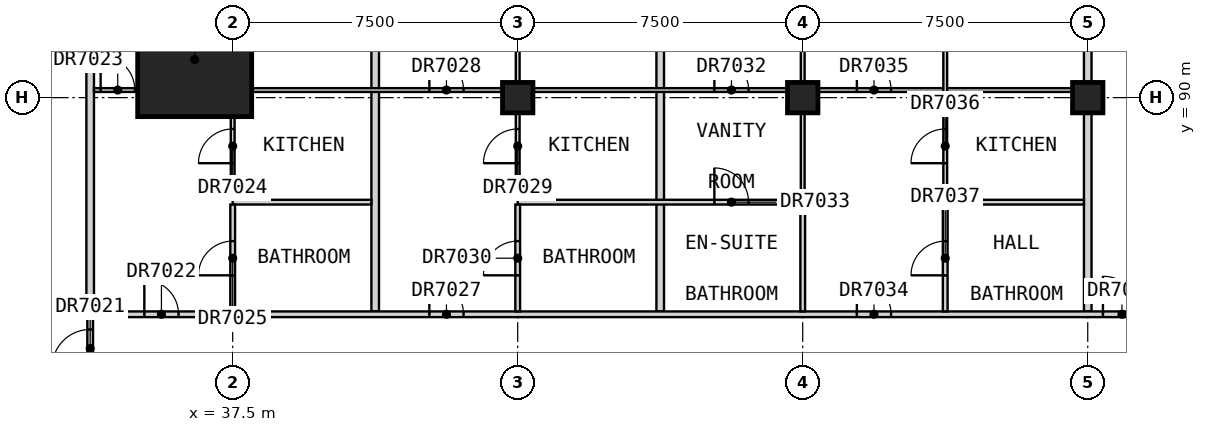
"""IFC4 building model, lengths in metres.
Left out: names, types, materials, properties, quantities, classifications, styles, units other than length and angle.
Written with IfcOpenShell. Run it as: python <this file> out.ifc"""

import sys

from ifc_helpers import new_model, si_unit, direction, frame, frame_2d, origin, origin_2d, place, context, subcontext, project, spatial, rectangle, extrude, element, fill, save


model = new_model("IFC4")
c1 = context("Model", 3, precision=1e-05, world=origin(), true_north=direction((0.0, 1.0)))
c2 = subcontext(c1, "Body", "Model", "MODEL_VIEW")
j1 = project(units=[si_unit("LENGTHUNIT", "METRE"), si_unit("PLANEANGLEUNIT", "RADIAN")], contexts=[c1])
p1 = place(None, origin())
s1 = spatial("IfcSite", under=j1, at=p1, CompositionType="ELEMENT")
p2 = place(p1, origin())
s2 = spatial("IfcBuilding", under=s1, at=p2, CompositionType="ELEMENT")
p3 = place(p2, frame((0.0, 0.0, 230.2)))
s3 = spatial("IfcBuildingStorey", under=s2, at=p3, CompositionType="ELEMENT", Elevation=230.2)
for number, where, z_axis, x_axis in (
    (1, (45.0, 90.0, 0.0), (0.0, 0.0, 1.0), (1.0, 0.0, 0.0)),
    (2, (52.5, 90.0, 0.0), (0.0, 0.0, 1.0), (1.0, 0.0, 0.0)),
    (3, (60.0, 90.0, 0.0), (0.0, 0.0, 1.0), (1.0, 0.0, 0.0)),
):
    element("IfcColumn", number, at=place(p3, frame(where, z_axis=z_axis, x_axis=x_axis)), inside=s3, PredefinedType="COLUMN", context=c2, shape_type="SweptSolid", body=[
        extrude(rectangle(XDim=0.8, YDim=0.8, at=origin_2d()), origin(), (0.0, 0.0, 1.0), 3.5),
    ])
p4 = place(p3, frame((36.5, 91.0, 0.0), z_axis=(0.0, 0.0, 1.0), x_axis=(1.0, 0.0, 0.0)))
e4 = element("IfcColumn", 4, at=p4, inside=s3, PredefinedType="COLUMN", context=c2, shape_type="SweptSolid", body=[
    extrude(rectangle(XDim=3.0, YDim=3.0, at=origin_2d()), origin(), (0.0, 0.0, 1.0), 3.5),
])
p5 = place(p3, frame((33.75, 84.3, 0.0), z_axis=(0.0, 0.0, 1.0), x_axis=(0.0, 1.0, 0.0)))
e5 = element("IfcWall", 5, at=p5, inside=s3, PredefinedType="PARTITIONING", context=c2, shape_type="SweptSolid", body=[
    extrude(rectangle(XDim=7.39, YDim=0.2, at=frame_2d((3.695, 0.0))), origin(), (0.0, 0.0, 1.0), 3.25),
])
for number, where, z_axis, x_axis in (
    (6, (41.25, 84.375, 0.0), (0.0, 0.0, 1.0), (0.0, 1.0, 0.0)),
    (7, (48.75, 84.375, 0.0), (0.0, 0.0, 1.0), (0.0, 1.0, 0.0)),
):
    element("IfcWall", number, at=place(p3, frame(where, z_axis=z_axis, x_axis=x_axis)), inside=s3, PredefinedType="PARTITIONING", context=c2, shape_type="SweptSolid", body=[
        extrude(rectangle(XDim=12.315, YDim=0.2, at=frame_2d((6.157, 0.0))), origin(), (0.0, 0.0, 1.0), 3.25),
    ])
p6 = place(p3, frame((60.0, 84.375, 0.0), z_axis=(0.0, 0.0, 1.0), x_axis=(0.0, 1.0, 0.0)))
e8 = element("IfcWall", 8, at=p6, inside=s3, PredefinedType="PARTITIONING", context=c2, shape_type="SweptSolid", body=[
    extrude(rectangle(XDim=13.125, YDim=0.2, at=frame_2d((6.562, 0.0))), origin(), (0.0, 0.0, 1.0), 3.25),
])
p7 = place(p3, frame((33.85, 84.3, 0.0), z_axis=(0.0, 0.0, 1.0), x_axis=(1.0, 0.0, 0.0)))
e9 = element("IfcWall", 9, at=p7, inside=s3, PredefinedType="PARTITIONING", context=c2, shape_type="SweptSolid", body=[
    extrude(rectangle(XDim=27.95, YDim=0.15, at=frame_2d((13.975, 0.0))), origin(), (0.0, 0.0, 1.0), 3.25),
])
p8 = place(p7, frame((1.325, 0.0, 0.0)))
e10 = element("IfcOpeningElement", 10, at=p8, cuts=e9, PredefinedType="OPENING", context=c2, shape_type="SweptSolid", body=[
    extrude(rectangle(XDim=0.9, YDim=2.1, at=frame_2d((0.45, 1.05))), frame((0.0, 0.085, 0.0), z_axis=(0.0, -1.0, 0.0), x_axis=(1.0, 0.0, 0.0)), (0.0, 0.0, 1.0), 0.17),
])
p9 = place(p7, frame((8.825, 0.0, 0.0)))
e11 = element("IfcOpeningElement", 11, at=p9, cuts=e9, PredefinedType="OPENING", context=c2, shape_type="SweptSolid", body=[
    extrude(rectangle(XDim=0.9, YDim=2.1, at=frame_2d((0.45, 1.05))), frame((0.0, 0.085, 0.0), z_axis=(0.0, -1.0, 0.0), x_axis=(1.0, 0.0, 0.0)), (0.0, 0.0, 1.0), 0.17),
])
p10 = place(p7, frame((20.075, 0.0, 0.0)))
e12 = element("IfcOpeningElement", 12, at=p10, cuts=e9, PredefinedType="OPENING", context=c2, shape_type="SweptSolid", body=[
    extrude(rectangle(XDim=0.9, YDim=2.1, at=frame_2d((0.45, 1.05))), frame((0.0, 0.085, 0.0), z_axis=(0.0, -1.0, 0.0), x_axis=(1.0, 0.0, 0.0)), (0.0, 0.0, 1.0), 0.17),
])
p11 = place(p7, frame((26.55, 0.0, 0.0)))
e13 = element("IfcOpeningElement", 13, at=p11, cuts=e9, PredefinedType="OPENING", context=c2, shape_type="SweptSolid", body=[
    extrude(rectangle(XDim=1.0, YDim=2.1, at=frame_2d((0.5, 1.05))), frame((0.0, 0.085, 0.0), z_axis=(0.0, -1.0, 0.0), x_axis=(1.0, 0.0, 0.0)), (0.0, 0.0, 1.0), 0.17),
])
p12 = place(p3, frame((33.75, 82.5, 0.0), z_axis=(0.0, 0.0, 1.0), x_axis=(0.0, 1.0, 0.0)))
e14 = element("IfcWall", 14, at=p12, inside=s3, PredefinedType="PARTITIONING", context=c2, shape_type="SweptSolid", body=[
    extrude(rectangle(XDim=1.725, YDim=0.15, at=frame_2d((0.863, 0.0))), origin(), (0.0, 0.0, 1.0), 3.25),
])
p13 = place(p12, frame((0.4, 0.0, 0.0)))
e15 = element("IfcOpeningElement", 15, at=p13, cuts=e14, PredefinedType="OPENING", context=c2, shape_type="SweptSolid", body=[
    extrude(rectangle(XDim=1.0, YDim=2.1, at=frame_2d((0.5, 1.05))), frame((0.0, 0.085, 0.0), z_axis=(0.0, -1.0, 0.0), x_axis=(1.0, 0.0, 0.0)), (0.0, 0.0, 1.0), 0.17),
])
p14 = place(p3, frame((33.85, 90.2, 0.0), z_axis=(0.0, 0.0, 1.0), x_axis=(1.0, 0.0, 0.0)))
e16 = element("IfcWall", 16, at=p14, inside=s3, PredefinedType="PARTITIONING", context=c2, shape_type="SweptSolid", body=[
    extrude(rectangle(XDim=26.05, YDim=0.1, at=frame_2d((13.025, 0.0))), origin(), (0.0, 0.0, 1.0), 3.25),
])
p15 = place(p14, frame((0.175, 0.0, 0.0)))
e17 = element("IfcOpeningElement", 17, at=p15, cuts=e16, PredefinedType="OPENING", context=c2, shape_type="SweptSolid", body=[
    extrude(rectangle(XDim=0.9, YDim=2.1, at=frame_2d((0.45, 1.05))), frame((0.0, 0.06, 0.0), z_axis=(0.0, -1.0, 0.0), x_axis=(1.0, 0.0, 0.0)), (0.0, 0.0, 1.0), 0.12),
])
p16 = place(p14, frame((8.825, 0.0, 0.0)))
e18 = element("IfcOpeningElement", 18, at=p16, cuts=e16, PredefinedType="OPENING", context=c2, shape_type="SweptSolid", body=[
    extrude(rectangle(XDim=0.9, YDim=2.1, at=frame_2d((0.45, 1.05))), frame((0.0, 0.06, 0.0), z_axis=(0.0, -1.0, 0.0), x_axis=(1.0, 0.0, 0.0)), (0.0, 0.0, 1.0), 0.12),
])
p17 = place(p14, frame((16.325, 0.0, 0.0)))
e19 = element("IfcOpeningElement", 19, at=p17, cuts=e16, PredefinedType="OPENING", context=c2, shape_type="SweptSolid", body=[
    extrude(rectangle(XDim=0.9, YDim=2.1, at=frame_2d((0.45, 1.05))), frame((0.0, 0.06, 0.0), z_axis=(0.0, -1.0, 0.0), x_axis=(1.0, 0.0, 0.0)), (0.0, 0.0, 1.0), 0.12),
])
p18 = place(p14, frame((20.075, 0.0, 0.0)))
e20 = element("IfcOpeningElement", 20, at=p18, cuts=e16, PredefinedType="OPENING", context=c2, shape_type="SweptSolid", body=[
    extrude(rectangle(XDim=0.9, YDim=2.1, at=frame_2d((0.45, 1.05))), frame((0.0, 0.06, 0.0), z_axis=(0.0, -1.0, 0.0), x_axis=(1.0, 0.0, 0.0)), (0.0, 0.0, 1.0), 0.12),
])
p19 = place(p3, frame((37.5, 87.312, 0.0), z_axis=(0.0, 0.0, 1.0), x_axis=(0.0, 1.0, 0.0)))
e21 = element("IfcWall", 21, at=p19, inside=s3, PredefinedType="PARTITIONING", context=c2, shape_type="SweptSolid", body=[
    extrude(rectangle(XDim=10.188, YDim=0.1, at=frame_2d((5.094, 0.0))), origin(), (0.0, 0.0, 1.0), 2.75),
])
p20 = place(p19, frame((0.962, 0.0, 0.0)))
e22 = element("IfcOpeningElement", 22, at=p20, cuts=e21, PredefinedType="OPENING", context=c2, shape_type="SweptSolid", body=[
    extrude(rectangle(XDim=0.9, YDim=2.1, at=frame_2d((0.45, 1.05))), frame((0.0, 0.06, 0.0), z_axis=(0.0, -1.0, 0.0), x_axis=(1.0, 0.0, 0.0)), (0.0, 0.0, 1.0), 0.12),
])
p21 = place(p19, frame((6.087, 0.0, 0.0)))
e23 = element("IfcOpeningElement", 23, at=p21, cuts=e21, PredefinedType="OPENING", context=c2, shape_type="SweptSolid", body=[
    extrude(rectangle(XDim=0.9, YDim=2.1, at=frame_2d((0.45, 1.05))), frame((0.0, 0.06, 0.0), z_axis=(0.0, -1.0, 0.0), x_axis=(1.0, 0.0, 0.0)), (0.0, 0.0, 1.0), 0.12),
])
p22 = place(p3, frame((45.0, 87.312, 0.0), z_axis=(0.0, 0.0, 1.0), x_axis=(0.0, 1.0, 0.0)))
e24 = element("IfcWall", 24, at=p22, inside=s3, PredefinedType="PARTITIONING", context=c2, shape_type="SweptSolid", body=[
    extrude(rectangle(XDim=10.188, YDim=0.1, at=frame_2d((5.094, 0.0))), origin(), (0.0, 0.0, 1.0), 3.25),
])
p23 = place(p22, frame((0.962, 0.0, 0.0)))
e25 = element("IfcOpeningElement", 25, at=p23, cuts=e24, PredefinedType="OPENING", context=c2, shape_type="SweptSolid", body=[
    extrude(rectangle(XDim=0.9, YDim=2.1, at=frame_2d((0.45, 1.05))), frame((0.0, 0.06, 0.0), z_axis=(0.0, -1.0, 0.0), x_axis=(1.0, 0.0, 0.0)), (0.0, 0.0, 1.0), 0.12),
])
p24 = place(p22, frame((6.087, 0.0, 0.0)))
e26 = element("IfcOpeningElement", 26, at=p24, cuts=e24, PredefinedType="OPENING", context=c2, shape_type="SweptSolid", body=[
    extrude(rectangle(XDim=0.9, YDim=2.1, at=frame_2d((0.45, 1.05))), frame((0.0, 0.06, 0.0), z_axis=(0.0, -1.0, 0.0), x_axis=(1.0, 0.0, 0.0)), (0.0, 0.0, 1.0), 0.12),
])
p25 = place(p3, frame((52.5, 87.312, 0.0), z_axis=(0.0, 0.0, 1.0), x_axis=(0.0, 1.0, 0.0)))
e27 = element("IfcWall", 27, at=p25, inside=s3, PredefinedType="PARTITIONING", context=c2, shape_type="SweptSolid", body=[
    extrude(rectangle(XDim=10.188, YDim=0.1, at=frame_2d((5.094, 0.0))), origin(), (0.0, 0.0, 1.0), 3.25),
])
p26 = place(p25, frame((6.087, 0.0, 0.0)))
e28 = element("IfcOpeningElement", 28, at=p26, cuts=e27, PredefinedType="OPENING", context=c2, shape_type="SweptSolid", body=[
    extrude(rectangle(XDim=0.9, YDim=2.1, at=frame_2d((0.45, 1.05))), frame((0.0, 0.06, 0.0), z_axis=(0.0, -1.0, 0.0), x_axis=(1.0, 0.0, 0.0)), (0.0, 0.0, 1.0), 0.12),
])
p27 = place(p3, frame((56.25, 87.312, 0.0), z_axis=(0.0, 0.0, 1.0), x_axis=(0.0, 1.0, 0.0)))
e29 = element("IfcWall", 29, at=p27, inside=s3, PredefinedType="PARTITIONING", context=c2, shape_type="SweptSolid", body=[
    extrude(rectangle(XDim=9.377, YDim=0.1, at=frame_2d((4.689, 0.0))), origin(), (0.0, 0.0, 1.0), 3.25),
])
p28 = place(p27, frame((0.962, 0.0, 0.0)))
e30 = element("IfcOpeningElement", 30, at=p28, cuts=e29, PredefinedType="OPENING", context=c2, shape_type="SweptSolid", body=[
    extrude(rectangle(XDim=0.9, YDim=2.1, at=frame_2d((0.45, 1.05))), frame((0.0, 0.06, 0.0), z_axis=(0.0, -1.0, 0.0), x_axis=(1.0, 0.0, 0.0)), (0.0, 0.0, 1.0), 0.12),
])
p29 = place(p27, frame((6.087, 0.0, 0.0)))
e31 = element("IfcOpeningElement", 31, at=p29, cuts=e29, PredefinedType="OPENING", context=c2, shape_type="SweptSolid", body=[
    extrude(rectangle(XDim=0.9, YDim=2.1, at=frame_2d((0.45, 1.05))), frame((0.0, 0.06, 0.0), z_axis=(0.0, -1.0, 0.0), x_axis=(1.0, 0.0, 0.0)), (0.0, 0.0, 1.0), 0.12),
])
p30 = place(p3, frame((37.5, 87.25, 0.0), z_axis=(0.0, 0.0, 1.0), x_axis=(1.0, 0.0, 0.0)))
e32 = element("IfcWall", 32, at=p30, inside=s3, PredefinedType="PARTITIONING", context=c2, shape_type="SweptSolid", body=[
    extrude(rectangle(XDim=3.65, YDim=0.125, at=frame_2d((1.825, 0.0))), origin(), (0.0, 0.0, 1.0), 3.25),
])
p31 = place(p3, frame((45.0, 87.25, 0.0), z_axis=(0.0, 0.0, 1.0), x_axis=(1.0, 0.0, 0.0)))
e33 = element("IfcWall", 33, at=p31, inside=s3, PredefinedType="PARTITIONING", context=c2, shape_type="SweptSolid", body=[
    extrude(rectangle(XDim=7.5, YDim=0.125, at=frame_2d((3.75, 0.0))), origin(), (0.0, 0.0, 1.0), 3.25),
])
p32 = place(p31, frame((5.175, 0.0, 0.0)))
e34 = element("IfcOpeningElement", 34, at=p32, cuts=e33, PredefinedType="OPENING", context=c2, shape_type="SweptSolid", body=[
    extrude(rectangle(XDim=0.9, YDim=2.1, at=frame_2d((0.45, 1.05))), frame((0.0, 0.073, 0.0), z_axis=(0.0, -1.0, 0.0), x_axis=(1.0, 0.0, 0.0)), (0.0, 0.0, 1.0), 0.145),
])
p33 = place(p3, frame((56.25, 87.25, 0.0), z_axis=(0.0, 0.0, 1.0), x_axis=(1.0, 0.0, 0.0)))
e35 = element("IfcWall", 35, at=p33, inside=s3, PredefinedType="PARTITIONING", context=c2, shape_type="SweptSolid", body=[
    extrude(rectangle(XDim=3.65, YDim=0.125, at=frame_2d((1.825, 0.0))), origin(), (0.0, 0.0, 1.0), 3.25),
])
p34 = place(p3, frame((37.5, 84.375, 0.0), z_axis=(0.0, 0.0, 1.0), x_axis=(0.0, 1.0, 0.0)))
e36 = element("IfcWall", 36, at=p34, inside=s3, PredefinedType="PARTITIONING", context=c2, shape_type="SweptSolid", body=[
    extrude(rectangle(XDim=2.812, YDim=0.125, at=frame_2d((1.406, 0.0))), origin(), (0.0, 0.0, 1.0), 3.25),
])
p35 = place(p34, frame((0.95, 0.0, 0.0)))
e37 = element("IfcOpeningElement", 37, at=p35, cuts=e36, PredefinedType="OPENING", context=c2, shape_type="SweptSolid", body=[
    extrude(rectangle(XDim=0.9, YDim=2.1, at=frame_2d((0.45, 1.05))), frame((0.0, 0.073, 0.0), z_axis=(0.0, -1.0, 0.0), x_axis=(1.0, 0.0, 0.0)), (0.0, 0.0, 1.0), 0.145),
])
p36 = place(p3, frame((45.0, 84.375, 0.0), z_axis=(0.0, 0.0, 1.0), x_axis=(0.0, 1.0, 0.0)))
e38 = element("IfcWall", 38, at=p36, inside=s3, PredefinedType="PARTITIONING", context=c2, shape_type="SweptSolid", body=[
    extrude(rectangle(XDim=2.812, YDim=0.125, at=frame_2d((1.406, 0.0))), origin(), (0.0, 0.0, 1.0), 3.25),
])
p37 = place(p36, frame((0.95, 0.0, 0.0)))
e39 = element("IfcOpeningElement", 39, at=p37, cuts=e38, PredefinedType="OPENING", context=c2, shape_type="SweptSolid", body=[
    extrude(rectangle(XDim=0.9, YDim=2.1, at=frame_2d((0.45, 1.05))), frame((0.0, 0.073, 0.0), z_axis=(0.0, -1.0, 0.0), x_axis=(1.0, 0.0, 0.0)), (0.0, 0.0, 1.0), 0.145),
])
p38 = place(p3, frame((52.5, 84.375, 0.0), z_axis=(0.0, 0.0, 1.0), x_axis=(0.0, 1.0, 0.0)))
e40 = element("IfcWall", 40, at=p38, inside=s3, PredefinedType="PARTITIONING", context=c2, shape_type="SweptSolid", body=[
    extrude(rectangle(XDim=2.812, YDim=0.125, at=frame_2d((1.406, 0.0))), origin(), (0.0, 0.0, 1.0), 3.25),
])
p39 = place(p3, frame((56.25, 84.375, 0.0), z_axis=(0.0, 0.0, 1.0), x_axis=(0.0, 1.0, 0.0)))
e41 = element("IfcWall", 41, at=p39, inside=s3, PredefinedType="PARTITIONING", context=c2, shape_type="SweptSolid", body=[
    extrude(rectangle(XDim=2.812, YDim=0.125, at=frame_2d((1.406, 0.0))), origin(), (0.0, 0.0, 1.0), 3.25),
])
p40 = place(p39, frame((0.95, 0.0, 0.0)))
e42 = element("IfcOpeningElement", 42, at=p40, cuts=e41, PredefinedType="OPENING", context=c2, shape_type="SweptSolid", body=[
    extrude(rectangle(XDim=0.9, YDim=2.1, at=frame_2d((0.45, 1.05))), frame((0.0, 0.073, 0.0), z_axis=(0.0, -1.0, 0.0), x_axis=(1.0, 0.0, 0.0)), (0.0, 0.0, 1.0), 0.145),
])
p41 = place(p13, origin())
e43 = element("IfcDoor", 43, at=p41, inside=s3, OperationType="SINGLE_SWING_LEFT", PredefinedType="DOOR", context=c2, shape_type="SweptSolid", body=[
    extrude(rectangle(XDim=1.0, YDim=2.1, at=frame_2d((0.5, 1.05))), frame((0.0, 0.025, 0.0), z_axis=(0.0, -1.0, 0.0), x_axis=(1.0, 0.0, 0.0)), (0.0, 0.0, 1.0), 0.05),
])
fill(e15, e43)
p42 = place(p8, origin())
e44 = element("IfcDoor", 44, at=p42, inside=s3, OperationType="SINGLE_SWING_LEFT", PredefinedType="DOOR", context=c2, shape_type="SweptSolid", body=[
    extrude(rectangle(XDim=0.9, YDim=2.1, at=frame_2d((0.45, 1.05))), frame((0.0, 0.025, 0.0), z_axis=(0.0, -1.0, 0.0), x_axis=(1.0, 0.0, 0.0)), (0.0, 0.0, 1.0), 0.05),
])
fill(e10, e44)
p43 = place(p15, origin())
e45 = element("IfcDoor", 45, at=p43, inside=s3, OperationType="SINGLE_SWING_RIGHT", PredefinedType="DOOR", context=c2, shape_type="SweptSolid", body=[
    extrude(rectangle(XDim=0.9, YDim=2.1, at=frame_2d((0.45, 1.05))), frame((0.0, 0.025, 0.0), z_axis=(0.0, -1.0, 0.0), x_axis=(1.0, 0.0, 0.0)), (0.0, 0.0, 1.0), 0.05),
])
fill(e17, e45)
p44 = place(p20, origin())
e46 = element("IfcDoor", 46, at=p44, inside=s3, OperationType="SINGLE_SWING_RIGHT", PredefinedType="DOOR", context=c2, shape_type="SweptSolid", body=[
    extrude(rectangle(XDim=0.9, YDim=2.1, at=frame_2d((0.45, 1.05))), frame((0.0, 0.025, 0.0), z_axis=(0.0, -1.0, 0.0), x_axis=(1.0, 0.0, 0.0)), (0.0, 0.0, 1.0), 0.05),
])
fill(e22, e46)
p45 = place(p35, origin())
e47 = element("IfcDoor", 47, at=p45, inside=s3, OperationType="SINGLE_SWING_RIGHT", PredefinedType="DOOR", context=c2, shape_type="SweptSolid", body=[
    extrude(rectangle(XDim=0.9, YDim=2.1, at=frame_2d((0.45, 1.05))), frame((0.0, 0.025, 0.0), z_axis=(0.0, -1.0, 0.0), x_axis=(1.0, 0.0, 0.0)), (0.0, 0.0, 1.0), 0.05),
])
fill(e37, e47)
p46 = place(p9, origin())
e48 = element("IfcDoor", 48, at=p46, inside=s3, OperationType="SINGLE_SWING_LEFT", PredefinedType="DOOR", context=c2, shape_type="SweptSolid", body=[
    extrude(rectangle(XDim=0.9, YDim=2.1, at=frame_2d((0.45, 1.05))), frame((0.0, 0.025, 0.0), z_axis=(0.0, -1.0, 0.0), x_axis=(1.0, 0.0, 0.0)), (0.0, 0.0, 1.0), 0.05),
])
fill(e11, e48)
p47 = place(p16, origin())
e49 = element("IfcDoor", 49, at=p47, inside=s3, OperationType="SINGLE_SWING_RIGHT", PredefinedType="DOOR", context=c2, shape_type="SweptSolid", body=[
    extrude(rectangle(XDim=0.9, YDim=2.1, at=frame_2d((0.45, 1.05))), frame((0.0, 0.025, 0.0), z_axis=(0.0, -1.0, 0.0), x_axis=(1.0, 0.0, 0.0)), (0.0, 0.0, 1.0), 0.05),
])
fill(e18, e49)
p48 = place(p23, origin())
e50 = element("IfcDoor", 50, at=p48, inside=s3, OperationType="SINGLE_SWING_RIGHT", PredefinedType="DOOR", context=c2, shape_type="SweptSolid", body=[
    extrude(rectangle(XDim=0.9, YDim=2.1, at=frame_2d((0.45, 1.05))), frame((0.0, 0.025, 0.0), z_axis=(0.0, -1.0, 0.0), x_axis=(1.0, 0.0, 0.0)), (0.0, 0.0, 1.0), 0.05),
])
fill(e25, e50)
p49 = place(p37, origin())
e51 = element("IfcDoor", 51, at=p49, inside=s3, OperationType="SINGLE_SWING_RIGHT", PredefinedType="DOOR", context=c2, shape_type="SweptSolid", body=[
    extrude(rectangle(XDim=0.9, YDim=2.1, at=frame_2d((0.45, 1.05))), frame((0.0, 0.025, 0.0), z_axis=(0.0, -1.0, 0.0), x_axis=(1.0, 0.0, 0.0)), (0.0, 0.0, 1.0), 0.05),
])
fill(e39, e51)
p50 = place(p17, origin())
e52 = element("IfcDoor", 52, at=p50, inside=s3, OperationType="SINGLE_SWING_RIGHT", PredefinedType="DOOR", context=c2, shape_type="SweptSolid", body=[
    extrude(rectangle(XDim=0.9, YDim=2.1, at=frame_2d((0.45, 1.05))), frame((0.0, 0.025, 0.0), z_axis=(0.0, -1.0, 0.0), x_axis=(1.0, 0.0, 0.0)), (0.0, 0.0, 1.0), 0.05),
])
fill(e19, e52)
p51 = place(p32, origin())
e53 = element("IfcDoor", 53, at=p51, inside=s3, OperationType="SINGLE_SWING_RIGHT", PredefinedType="DOOR", context=c2, shape_type="SweptSolid", body=[
    extrude(rectangle(XDim=0.9, YDim=2.1, at=frame_2d((0.45, 1.05))), frame((0.0, 0.025, 0.0), z_axis=(0.0, -1.0, 0.0), x_axis=(1.0, 0.0, 0.0)), (0.0, 0.0, 1.0), 0.05),
])
fill(e34, e53)
p52 = place(p10, origin())
e54 = element("IfcDoor", 54, at=p52, inside=s3, OperationType="SINGLE_SWING_LEFT", PredefinedType="DOOR", context=c2, shape_type="SweptSolid", body=[
    extrude(rectangle(XDim=0.9, YDim=2.1, at=frame_2d((0.45, 1.05))), frame((0.0, 0.025, 0.0), z_axis=(0.0, -1.0, 0.0), x_axis=(1.0, 0.0, 0.0)), (0.0, 0.0, 1.0), 0.05),
])
fill(e12, e54)
p53 = place(p18, origin())
e55 = element("IfcDoor", 55, at=p53, inside=s3, OperationType="SINGLE_SWING_RIGHT", PredefinedType="DOOR", context=c2, shape_type="SweptSolid", body=[
    extrude(rectangle(XDim=0.9, YDim=2.1, at=frame_2d((0.45, 1.05))), frame((0.0, 0.025, 0.0), z_axis=(0.0, -1.0, 0.0), x_axis=(1.0, 0.0, 0.0)), (0.0, 0.0, 1.0), 0.05),
])
fill(e20, e55)
p54 = place(p28, origin())
e56 = element("IfcDoor", 56, at=p54, inside=s3, OperationType="SINGLE_SWING_RIGHT", PredefinedType="DOOR", context=c2, shape_type="SweptSolid", body=[
    extrude(rectangle(XDim=0.9, YDim=2.1, at=frame_2d((0.45, 1.05))), frame((0.0, 0.025, 0.0), z_axis=(0.0, -1.0, 0.0), x_axis=(1.0, 0.0, 0.0)), (0.0, 0.0, 1.0), 0.05),
])
fill(e30, e56)
p55 = place(p40, origin())
e57 = element("IfcDoor", 57, at=p55, inside=s3, OperationType="SINGLE_SWING_RIGHT", PredefinedType="DOOR", context=c2, shape_type="SweptSolid", body=[
    extrude(rectangle(XDim=0.9, YDim=2.1, at=frame_2d((0.45, 1.05))), frame((0.0, 0.025, 0.0), z_axis=(0.0, -1.0, 0.0), x_axis=(1.0, 0.0, 0.0)), (0.0, 0.0, 1.0), 0.05),
])
fill(e42, e57)
p56 = place(p11, origin())
e58 = element("IfcDoor", 58, at=p56, inside=s3, OperationType="SINGLE_SWING_LEFT", PredefinedType="DOOR", context=c2, shape_type="SweptSolid", body=[
    extrude(rectangle(XDim=1.0, YDim=2.1, at=frame_2d((0.5, 1.05))), frame((0.0, 0.025, 0.0), z_axis=(0.0, -1.0, 0.0), x_axis=(1.0, 0.0, 0.0)), (0.0, 0.0, 1.0), 0.05),
])
fill(e13, e58)
save(model, sys.argv[1])
